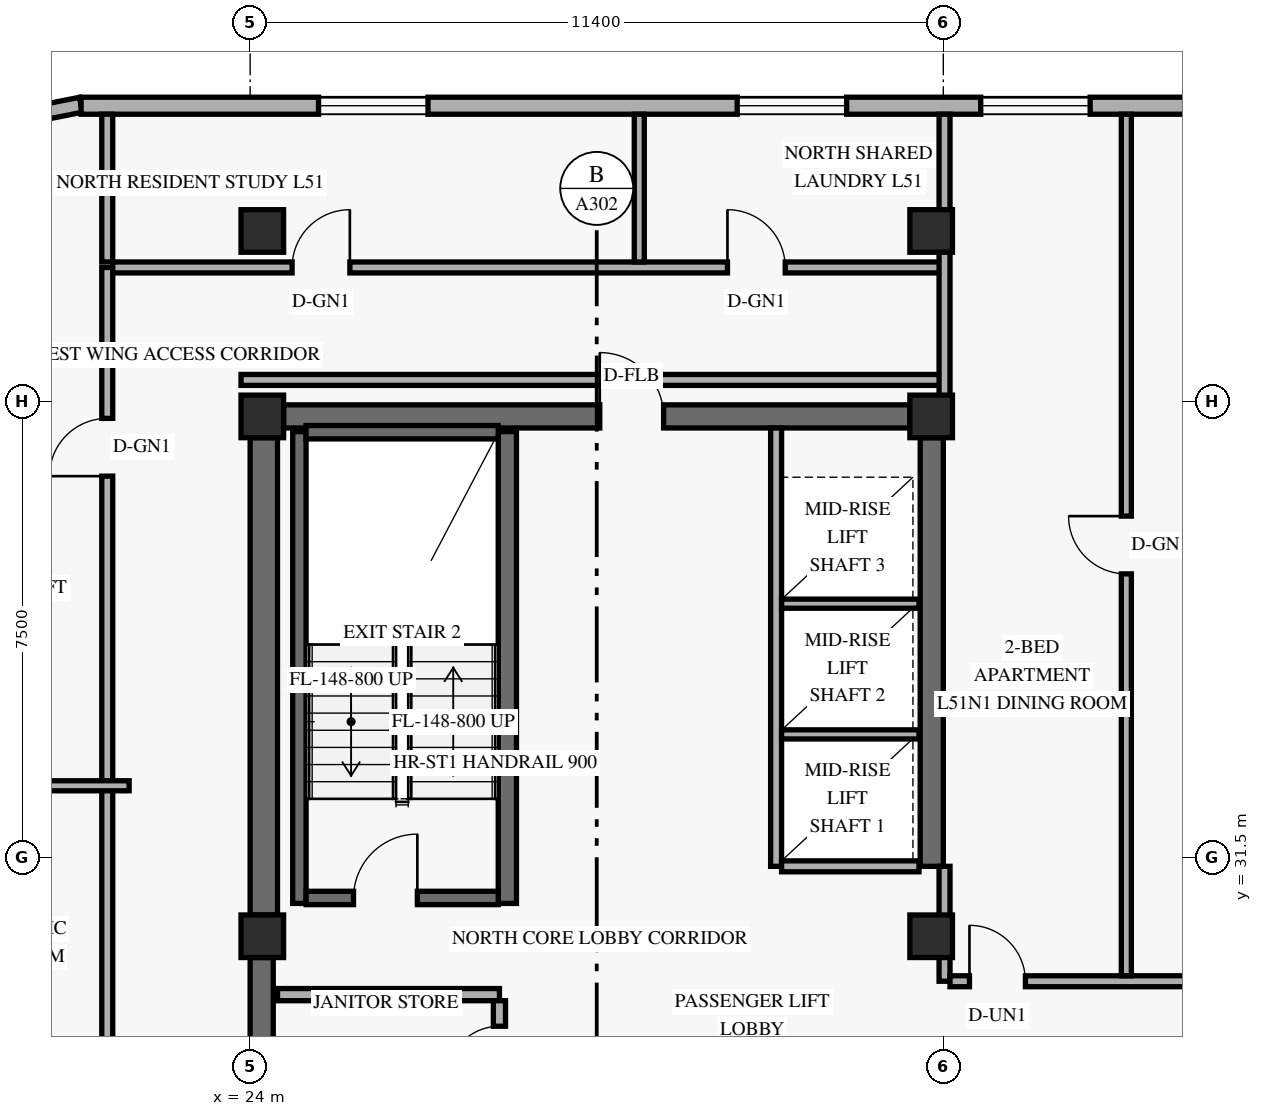
"""IFC4 building model, lengths in metres.
Left out: names, types, materials, properties, quantities, classifications, styles, units other than length and angle.
Written with IfcOpenShell. Run it as: python <this file> out.ifc"""

import sys

from ifc_helpers import new_model, si_unit, direction, frame, frame_2d, origin, origin_2d, place, context, subcontext, project, spatial, rectangle, extrude, element, fill, save


model = new_model("IFC4")
c1 = context("Model", 3, precision=1e-05, world=origin(), true_north=direction((0.0, 1.0)))
c2 = subcontext(c1, "Body", "Model", "MODEL_VIEW")
j1 = project(units=[si_unit("LENGTHUNIT", "METRE"), si_unit("PLANEANGLEUNIT", "RADIAN")], contexts=[c1])
p1 = place(None, origin())
s1 = spatial("IfcSite", under=j1, at=p1, CompositionType="ELEMENT")
p2 = place(p1, origin())
s2 = spatial("IfcBuilding", under=s1, at=p2, CompositionType="ELEMENT")
p3 = place(p2, frame((0.0, 0.0, 196.2)))
s3 = spatial("IfcBuildingStorey", under=s2, at=p3, CompositionType="ELEMENT", Elevation=196.2)
p4 = place(p3, frame((24.19, 17.9, 0.0), z_axis=(0.0, 0.0, 1.0), x_axis=(0.0, 1.0, 0.0)))
e1 = element("IfcWall", 1, at=p4, inside=s3, PredefinedType="SHEAR", context=c2, shape_type="SweptSolid", body=[
    extrude(rectangle(XDim=11.95, YDim=0.38, at=frame_2d((5.975, 0.0))), origin(), (0.0, 0.0, 1.0), 2.688),
])
p5 = place(p3, frame((24.225, 30.55, 0.0), z_axis=(0.0, 0.0, 1.0), x_axis=(0.0, 1.0, 0.0)))
e2 = element("IfcWall", 2, at=p5, inside=s3, PredefinedType="SHEAR", context=c2, shape_type="SweptSolid", body=[
    extrude(rectangle(XDim=7.85, YDim=0.45, at=frame_2d((3.925, 0.0))), origin(), (0.0, 0.0, 1.0), 2.688),
])
p6 = place(p3, frame((35.21, 31.35, 0.0), z_axis=(0.0, 0.0, 1.0), x_axis=(0.0, 1.0, 0.0)))
e3 = element("IfcWall", 3, at=p6, inside=s3, PredefinedType="SHEAR", context=c2, shape_type="SweptSolid", body=[
    extrude(rectangle(XDim=7.05, YDim=0.38, at=frame_2d((3.525, 0.0))), origin(), (0.0, 0.0, 1.0), 2.688),
])
p7 = place(p3, frame((24.55, 38.75, 0.0), z_axis=(0.0, 0.0, 1.0), x_axis=(1.0, 0.0, 0.0)))
e4 = element("IfcWall", 4, at=p7, inside=s3, PredefinedType="SHEAR", context=c2, shape_type="SweptSolid", body=[
    extrude(rectangle(XDim=10.3, YDim=0.38, at=frame_2d((5.15, 0.0))), origin(), (0.0, 0.0, 1.0), 3.3),
])
p8 = place(p7, frame((5.2, 0.0, 0.0)))
e5 = element("IfcOpeningElement", 5, at=p8, cuts=e4, PredefinedType="OPENING", context=c2, shape_type="SweptSolid", body=[
    extrude(rectangle(XDim=1.05, YDim=2.15, at=frame_2d((0.525, 1.075))), frame((0.0, 0.2, 0.0), z_axis=(0.0, -1.0, 0.0), x_axis=(1.0, 0.0, 0.0)), (0.0, 0.0, 1.0), 0.4),
])
p9 = place(p3, frame((24.81, 30.74, 0.0), z_axis=(0.0, 0.0, 1.0), x_axis=(0.0, 1.0, 0.0)))
e6 = element("IfcWall", 6, at=p9, inside=s3, PredefinedType="SHEAR", context=c2, shape_type="SweptSolid", body=[
    extrude(rectangle(XDim=7.76, YDim=0.22, at=frame_2d((3.88, 0.0))), origin(), (0.0, 0.0, 1.0), 3.3),
])
p10 = place(p3, frame((28.23, 30.74, 0.0), z_axis=(0.0, 0.0, 1.0), x_axis=(0.0, 1.0, 0.0)))
e7 = element("IfcWall", 7, at=p10, inside=s3, PredefinedType="SHEAR", context=c2, shape_type="SweptSolid", body=[
    extrude(rectangle(XDim=7.76, YDim=0.3, at=frame_2d((3.88, 0.0))), origin(), (0.0, 0.0, 1.0), 3.3),
])
p11 = place(p3, frame((24.92, 30.83, 0.0), z_axis=(0.0, 0.0, 1.0), x_axis=(1.0, 0.0, 0.0)))
e8 = element("IfcWall", 8, at=p11, inside=s3, PredefinedType="SHEAR", context=c2, shape_type="SweptSolid", body=[
    extrude(rectangle(XDim=3.16, YDim=0.22, at=frame_2d((1.58, 0.0))), origin(), (0.0, 0.0, 1.0), 3.3),
])
p12 = place(p11, frame((0.78, 0.0, 0.0)))
e9 = element("IfcOpeningElement", 9, at=p12, cuts=e8, PredefinedType="OPENING", context=c2, shape_type="SweptSolid", body=[
    extrude(rectangle(XDim=1.05, YDim=2.15, at=frame_2d((0.525, 1.075))), frame((0.0, 0.12, 0.0), z_axis=(0.0, -1.0, 0.0), x_axis=(1.0, 0.0, 0.0)), (0.0, 0.0, 1.0), 0.24),
])
p13 = place(p3, frame((24.92, 38.49, 0.0), z_axis=(0.0, 0.0, 1.0), x_axis=(1.0, 0.0, 0.0)))
e10 = element("IfcWall", 10, at=p13, inside=s3, PredefinedType="SHEAR", context=c2, shape_type="SweptSolid", body=[
    extrude(rectangle(XDim=3.16, YDim=0.22, at=frame_2d((1.58, 0.0))), origin(), (0.0, 0.0, 1.0), 3.3),
])
for number, where, z_axis, x_axis in (
    (11, (24.2, 30.2, 0.0), (0.0, 0.0, 1.0), (1.0, 0.0, 0.0)),
    (12, (24.2, 38.75, 0.0), (0.0, 0.0, 1.0), (1.0, 0.0, 0.0)),
    (13, (24.2, 41.8, 0.0), (0.0, 0.0, 1.0), (1.0, 0.0, 0.0)),
    (14, (35.2, 30.2, 0.0), (0.0, 0.0, 1.0), (1.0, 0.0, 0.0)),
    (15, (35.2, 38.75, 0.0), (0.0, 0.0, 1.0), (1.0, 0.0, 0.0)),
    (16, (35.2, 41.8, 0.0), (0.0, 0.0, 1.0), (1.0, 0.0, 0.0)),
):
    element("IfcColumn", number, at=place(p3, frame(where, z_axis=z_axis, x_axis=x_axis)), inside=s3, PredefinedType="COLUMN", context=c2, shape_type="SweptSolid", body=[
        extrude(rectangle(XDim=0.7, YDim=0.7, at=origin_2d()), origin(), (0.0, 0.0, 1.0), 3.6),
    ])
p14 = place(p3, frame((21.217, 43.876, 0.0), z_axis=(0.0, 0.0, 1.0), x_axis=(-0.980809899341, -0.19496651342, 0.0)))
e17 = element("IfcWall", 17, at=p14, inside=s3, PredefinedType="SOLIDWALL", context=c2, shape_type="SweptSolid", body=[
    extrude(rectangle(XDim=1.389, YDim=0.25, at=frame_2d((0.694, 0.0))), origin(), (0.0, 0.0, 1.0), 3.3),
])
p15 = place(p3, frame((54.98, 43.86, 0.0), z_axis=(0.0, 0.0, 1.0), x_axis=(-1.0, 0.0, 0.0)))
e18 = element("IfcWall", 18, at=p15, inside=s3, PredefinedType="SOLIDWALL", context=c2, shape_type="SweptSolid", body=[
    extrude(rectangle(XDim=33.76, YDim=0.28, at=frame_2d((16.88, 0.0))), origin(), (0.0, 0.0, 1.0), 3.3),
])
p16 = place(p15, frame((28.055, 0.0, 0.85)))
e19 = element("IfcOpeningElement", 19, at=p16, cuts=e18, PredefinedType="OPENING", context=c2, shape_type="SweptSolid", body=[
    extrude(rectangle(XDim=1.8, YDim=1.6, at=frame_2d((0.9, 0.8))), frame((0.0, 0.15, 0.0), z_axis=(0.0, -1.0, 0.0), x_axis=(1.0, 0.0, 0.0)), (0.0, 0.0, 1.0), 0.3),
])
p17 = place(p15, frame((21.17, 0.0, 0.85)))
e20 = element("IfcOpeningElement", 20, at=p17, cuts=e18, PredefinedType="OPENING", context=c2, shape_type="SweptSolid", body=[
    extrude(rectangle(XDim=1.8, YDim=1.6, at=frame_2d((0.9, 0.8))), frame((0.0, 0.15, 0.0), z_axis=(0.0, -1.0, 0.0), x_axis=(1.0, 0.0, 0.0)), (0.0, 0.0, 1.0), 0.3),
])
p18 = place(p15, frame((17.165, 0.0, 0.85)))
e21 = element("IfcOpeningElement", 21, at=p18, cuts=e18, PredefinedType="OPENING", context=c2, shape_type="SweptSolid", body=[
    extrude(rectangle(XDim=1.8, YDim=1.6, at=frame_2d((0.9, 0.8))), frame((0.0, 0.15, 0.0), z_axis=(0.0, -1.0, 0.0), x_axis=(1.0, 0.0, 0.0)), (0.0, 0.0, 1.0), 0.3),
])
p19 = place(p15, frame((12.77, 0.0, 0.85)))
e22 = element("IfcOpeningElement", 22, at=p19, cuts=e18, PredefinedType="OPENING", context=c2, shape_type="SweptSolid", body=[
    extrude(rectangle(XDim=1.8, YDim=1.6, at=frame_2d((0.9, 0.8))), frame((0.0, 0.15, 0.0), z_axis=(0.0, -1.0, 0.0), x_axis=(1.0, 0.0, 0.0)), (0.0, 0.0, 1.0), 0.3),
])
p20 = place(p15, frame((7.375, 0.0, 0.85)))
e23 = element("IfcOpeningElement", 23, at=p20, cuts=e18, PredefinedType="OPENING", context=c2, shape_type="SweptSolid", body=[
    extrude(rectangle(XDim=1.8, YDim=1.6, at=frame_2d((0.9, 0.8))), frame((0.0, 0.15, 0.0), z_axis=(0.0, -1.0, 0.0), x_axis=(1.0, 0.0, 0.0)), (0.0, 0.0, 1.0), 0.3),
])
p21 = place(p15, frame((4.28, 0.0, 0.85)))
e24 = element("IfcOpeningElement", 24, at=p21, cuts=e18, PredefinedType="OPENING", context=c2, shape_type="SweptSolid", body=[
    extrude(rectangle(XDim=1.2, YDim=1.5, at=frame_2d((0.6, 0.75))), frame((0.0, 0.15, 0.0), z_axis=(0.0, -1.0, 0.0), x_axis=(1.0, 0.0, 0.0)), (0.0, 0.0, 1.0), 0.3),
])
p22 = place(p15, frame((1.09, 0.0, 0.85)))
e25 = element("IfcOpeningElement", 25, at=p22, cuts=e18, PredefinedType="OPENING", context=c2, shape_type="SweptSolid", body=[
    extrude(rectangle(XDim=1.8, YDim=1.6, at=frame_2d((0.9, 0.8))), frame((0.0, 0.15, 0.0), z_axis=(0.0, -1.0, 0.0), x_axis=(1.0, 0.0, 0.0)), (0.0, 0.0, 1.0), 0.3),
])
p23 = place(p3, frame((24.45, 29.24, 0.0), z_axis=(0.0, 0.0, 1.0), x_axis=(1.0, 0.0, 0.0)))
e26 = element("IfcWall", 26, at=p23, inside=s3, PredefinedType="STANDARD", context=c2, shape_type="SweptSolid", body=[
    extrude(rectangle(XDim=3.65, YDim=0.2, at=frame_2d((1.825, 0.0))), origin(), (0.0, 0.0, 1.0), 3.3),
])
p24 = place(p3, frame((28.1, 24.39, 0.0), z_axis=(0.0, 0.0, 1.0), x_axis=(0.0, 1.0, 0.0)))
e27 = element("IfcWall", 27, at=p24, inside=s3, PredefinedType="STANDARD", context=c2, shape_type="SweptSolid", body=[
    extrude(rectangle(XDim=4.75, YDim=0.2, at=frame_2d((2.375, 0.0))), origin(), (0.0, 0.0, 1.0), 3.3),
])
p25 = place(p24, frame((0.21, 0.0, 0.0)))
e28 = element("IfcOpeningElement", 28, at=p25, cuts=e27, PredefinedType="OPENING", context=c2, shape_type="SweptSolid", body=[
    extrude(rectangle(XDim=0.86, YDim=2.1, at=frame_2d((0.43, 1.05))), frame((0.0, 0.11, 0.0), z_axis=(0.0, -1.0, 0.0), x_axis=(1.0, 0.0, 0.0)), (0.0, 0.0, 1.0), 0.22),
])
p26 = place(p24, frame((1.83, 0.0, 0.0)))
e29 = element("IfcOpeningElement", 29, at=p26, cuts=e27, PredefinedType="OPENING", context=c2, shape_type="SweptSolid", body=[
    extrude(rectangle(XDim=0.86, YDim=2.1, at=frame_2d((0.43, 1.05))), frame((0.0, 0.11, 0.0), z_axis=(0.0, -1.0, 0.0), x_axis=(1.0, 0.0, 0.0)), (0.0, 0.0, 1.0), 0.22),
])
p27 = place(p24, frame((3.47, 0.0, 0.0)))
e30 = element("IfcOpeningElement", 30, at=p27, cuts=e27, PredefinedType="OPENING", context=c2, shape_type="SweptSolid", body=[
    extrude(rectangle(XDim=0.86, YDim=2.1, at=frame_2d((0.43, 1.05))), frame((0.0, 0.11, 0.0), z_axis=(0.0, -1.0, 0.0), x_axis=(1.0, 0.0, 0.0)), (0.0, 0.0, 1.0), 0.22),
])
p28 = place(p3, frame((32.65, 31.35, 0.0), z_axis=(0.0, 0.0, 1.0), x_axis=(0.0, 1.0, 0.0)))
e31 = element("IfcWall", 31, at=p28, inside=s3, PredefinedType="STANDARD", context=c2, shape_type="SweptSolid", body=[
    extrude(rectangle(XDim=7.21, YDim=0.18, at=frame_2d((3.605, 0.0))), origin(), (0.0, 0.0, 1.0), 3.3),
])
p29 = place(p3, frame((32.74, 31.35, 0.0), z_axis=(0.0, 0.0, 1.0), x_axis=(1.0, 0.0, 0.0)))
e32 = element("IfcWall", 32, at=p29, inside=s3, PredefinedType="STANDARD", context=c2, shape_type="SweptSolid", body=[
    extrude(rectangle(XDim=2.26, YDim=0.18, at=frame_2d((1.13, 0.0))), origin(), (0.0, 0.0, 1.0), 3.3),
])
for number, where, z_axis, x_axis in (
    (33, (32.74, 33.52, 0.0), (0.0, 0.0, 1.0), (1.0, 0.0, 0.0)),
    (34, (32.74, 35.67, 0.0), (0.0, 0.0, 1.0), (1.0, 0.0, 0.0)),
):
    element("IfcWall", number, at=place(p3, frame(where, z_axis=z_axis, x_axis=x_axis)), inside=s3, PredefinedType="STANDARD", context=c2, shape_type="SweptSolid", body=[
        extrude(rectangle(XDim=2.26, YDim=0.15, at=frame_2d((1.13, 0.0))), origin(), (0.0, 0.0, 1.0), 3.3),
    ])
p30 = place(p3, frame((35.42, 29.46, 0.0), z_axis=(0.0, 0.0, 1.0), x_axis=(0.0, 1.0, 0.0)))
e35 = element("IfcWall", 35, at=p30, inside=s3, PredefinedType="STANDARD", context=c2, shape_type="SweptSolid", body=[
    extrude(rectangle(XDim=1.89, YDim=0.18, at=frame_2d((0.945, 0.0))), origin(), (0.0, 0.0, 1.0), 2.67),
])
p31 = place(p3, frame((35.51, 29.46, 0.0), z_axis=(0.0, 0.0, 1.0), x_axis=(1.0, 0.0, 0.0)))
e36 = element("IfcWall", 36, at=p31, inside=s3, PredefinedType="STANDARD", context=c2, shape_type="SweptSolid", body=[
    extrude(rectangle(XDim=13.69, YDim=0.18, at=frame_2d((6.845, 0.0))), origin(), (0.0, 0.0, 1.0), 2.67),
])
p32 = place(p31, frame((0.32, 0.0, 0.0)))
e37 = element("IfcOpeningElement", 37, at=p32, cuts=e36, PredefinedType="OPENING", context=c2, shape_type="SweptSolid", body=[
    extrude(rectangle(XDim=0.92, YDim=2.15, at=frame_2d((0.46, 1.075))), frame((0.0, 0.1, 0.0), z_axis=(0.0, -1.0, 0.0), x_axis=(1.0, 0.0, 0.0)), (0.0, 0.0, 1.0), 0.2),
])
p33 = place(p3, frame((21.65, 6.8, 0.0), z_axis=(0.0, 0.0, 1.0), x_axis=(0.0, 1.0, 0.0)))
e38 = element("IfcWall", 38, at=p33, inside=s3, PredefinedType="STANDARD", context=c2, shape_type="SweptSolid", body=[
    extrude(rectangle(XDim=34.4, YDim=0.18, at=frame_2d((17.2, 0.0))), origin(), (0.0, 0.0, 1.0), 2.67),
])
p34 = place(p33, frame((1.732, 0.0, 0.0)))
e39 = element("IfcOpeningElement", 39, at=p34, cuts=e38, PredefinedType="OPENING", context=c2, shape_type="SweptSolid", body=[
    extrude(rectangle(XDim=0.95, YDim=2.15, at=frame_2d((0.475, 1.075))), frame((0.0, 0.1, 0.0), z_axis=(0.0, -1.0, 0.0), x_axis=(1.0, 0.0, 0.0)), (0.0, 0.0, 1.0), 0.2),
])
p35 = place(p33, frame((10.768, 0.0, 0.0)))
e40 = element("IfcOpeningElement", 40, at=p35, cuts=e38, PredefinedType="OPENING", context=c2, shape_type="SweptSolid", body=[
    extrude(rectangle(XDim=0.95, YDim=2.15, at=frame_2d((0.475, 1.075))), frame((0.0, 0.1, 0.0), z_axis=(0.0, -1.0, 0.0), x_axis=(1.0, 0.0, 0.0)), (0.0, 0.0, 1.0), 0.2),
])
p36 = place(p33, frame((20.333, 0.0, 0.0)))
e41 = element("IfcOpeningElement", 41, at=p36, cuts=e38, PredefinedType="OPENING", context=c2, shape_type="SweptSolid", body=[
    extrude(rectangle(XDim=0.95, YDim=2.15, at=frame_2d((0.475, 1.075))), frame((0.0, 0.1, 0.0), z_axis=(0.0, -1.0, 0.0), x_axis=(1.0, 0.0, 0.0)), (0.0, 0.0, 1.0), 0.2),
])
p37 = place(p33, frame((30.968, 0.0, 0.0)))
e42 = element("IfcOpeningElement", 42, at=p37, cuts=e38, PredefinedType="OPENING", context=c2, shape_type="SweptSolid", body=[
    extrude(rectangle(XDim=0.95, YDim=2.15, at=frame_2d((0.475, 1.075))), frame((0.0, 0.1, 0.0), z_axis=(0.0, -1.0, 0.0), x_axis=(1.0, 0.0, 0.0)), (0.0, 0.0, 1.0), 0.2),
])
p38 = place(p3, frame((21.74, 41.2, 0.0), z_axis=(0.0, 0.0, 1.0), x_axis=(1.0, 0.0, 0.0)))
e43 = element("IfcWall", 43, at=p38, inside=s3, PredefinedType="STANDARD", context=c2, shape_type="SweptSolid", body=[
    extrude(rectangle(XDim=13.68, YDim=0.18, at=frame_2d((6.84, 0.0))), origin(), (0.0, 0.0, 1.0), 2.67),
])
p39 = place(p38, frame((2.95, 0.0, 0.0)))
e44 = element("IfcOpeningElement", 44, at=p39, cuts=e43, PredefinedType="OPENING", context=c2, shape_type="SweptSolid", body=[
    extrude(rectangle(XDim=0.95, YDim=2.15, at=frame_2d((0.475, 1.075))), frame((0.0, 0.1, 0.0), z_axis=(0.0, -1.0, 0.0), x_axis=(1.0, 0.0, 0.0)), (0.0, 0.0, 1.0), 0.2),
])
p40 = place(p38, frame((10.11, 0.0, 0.0)))
e45 = element("IfcOpeningElement", 45, at=p40, cuts=e43, PredefinedType="OPENING", context=c2, shape_type="SweptSolid", body=[
    extrude(rectangle(XDim=0.95, YDim=2.15, at=frame_2d((0.475, 1.075))), frame((0.0, 0.1, 0.0), z_axis=(0.0, -1.0, 0.0), x_axis=(1.0, 0.0, 0.0)), (0.0, 0.0, 1.0), 0.2),
])
p41 = place(p3, frame((23.85, 39.35, 0.0), z_axis=(0.0, 0.0, 1.0), x_axis=(1.0, 0.0, 0.0)))
e46 = element("IfcWall", 46, at=p41, inside=s3, PredefinedType="STANDARD", context=c2, shape_type="SweptSolid", body=[
    extrude(rectangle(XDim=11.57, YDim=0.18, at=frame_2d((5.785, 0.0))), origin(), (0.0, 0.0, 1.0), 2.67),
])
p42 = place(p3, frame((21.65, 41.29, 0.0), z_axis=(0.0, 0.0, 1.0), x_axis=(0.0, 1.0, 0.0)))
e47 = element("IfcWall", 47, at=p42, inside=s3, PredefinedType="PARTITIONING", context=c2, shape_type="SweptSolid", body=[
    extrude(rectangle(XDim=2.43, YDim=0.18, at=frame_2d((1.215, 0.0))), origin(), (0.0, 0.0, 1.0), 2.819),
])
p43 = place(p3, frame((35.42, 38.75, 0.0), z_axis=(0.0, 0.0, 1.0), x_axis=(0.0, 1.0, 0.0)))
e48 = element("IfcWall", 48, at=p43, inside=s3, PredefinedType="PARTITIONING", context=c2, shape_type="SweptSolid", body=[
    extrude(rectangle(XDim=4.97, YDim=0.18, at=frame_2d((2.485, 0.0))), origin(), (0.0, 0.0, 1.0), 2.67),
])
p44 = place(p3, frame((38.41, 29.55, 0.0), z_axis=(0.0, 0.0, 1.0), x_axis=(0.0, 1.0, 0.0)))
e49 = element("IfcWall", 49, at=p44, inside=s3, PredefinedType="PARTITIONING", context=c2, shape_type="SweptSolid", body=[
    extrude(rectangle(XDim=14.17, YDim=0.165, at=frame_2d((7.085, 0.0))), origin(), (0.0, 0.0, 1.0), 2.67),
])
p45 = place(p44, frame((6.61, 0.0, 0.0)))
e50 = element("IfcOpeningElement", 50, at=p45, cuts=e49, PredefinedType="OPENING", context=c2, shape_type="SweptSolid", body=[
    extrude(rectangle(XDim=0.95, YDim=2.15, at=frame_2d((0.475, 1.075))), frame((0.0, 0.093, 0.0), z_axis=(0.0, -1.0, 0.0), x_axis=(1.0, 0.0, 0.0)), (0.0, 0.0, 1.0), 0.185),
])
p46 = place(p3, frame((17.88, 32.675, 0.0), z_axis=(0.0, 0.0, 1.0), x_axis=(1.0, 0.0, 0.0)))
e51 = element("IfcWall", 51, at=p46, inside=s3, PredefinedType="PARTITIONING", context=c2, shape_type="SweptSolid", body=[
    extrude(rectangle(XDim=4.13, YDim=0.165, at=frame_2d((2.065, 0.0))), origin(), (0.0, 0.0, 1.0), 2.819),
])
p47 = place(p3, frame((30.4, 41.29, 0.0), z_axis=(0.0, 0.0, 1.0), x_axis=(0.0, 1.0, 0.0)))
e52 = element("IfcWall", 52, at=p47, inside=s3, PredefinedType="PARTITIONING", context=c2, shape_type="SweptSolid", body=[
    extrude(rectangle(XDim=2.43, YDim=0.165, at=frame_2d((1.215, 0.0))), origin(), (0.0, 0.0, 1.0), 2.819),
])
p48 = place(p16, origin())
e53 = element("IfcWindow", 53, at=p48, inside=s3, PartitioningType="SINGLE_PANEL", PredefinedType="WINDOW", context=c2, shape_type="SweptSolid", body=[
    extrude(rectangle(XDim=1.8, YDim=1.6, at=frame_2d((0.9, 0.8))), frame((0.0, 0.03, 0.0), z_axis=(0.0, -1.0, 0.0), x_axis=(1.0, 0.0, 0.0)), (0.0, 0.0, 1.0), 0.06),
])
fill(e19, e53)
p49 = place(p17, origin())
e54 = element("IfcWindow", 54, at=p49, inside=s3, PartitioningType="SINGLE_PANEL", PredefinedType="WINDOW", context=c2, shape_type="SweptSolid", body=[
    extrude(rectangle(XDim=1.8, YDim=1.6, at=frame_2d((0.9, 0.8))), frame((0.0, 0.03, 0.0), z_axis=(0.0, -1.0, 0.0), x_axis=(1.0, 0.0, 0.0)), (0.0, 0.0, 1.0), 0.06),
])
fill(e20, e54)
p50 = place(p18, origin())
e55 = element("IfcWindow", 55, at=p50, inside=s3, PartitioningType="SINGLE_PANEL", PredefinedType="WINDOW", context=c2, shape_type="SweptSolid", body=[
    extrude(rectangle(XDim=1.8, YDim=1.6, at=frame_2d((0.9, 0.8))), frame((0.0, 0.03, 0.0), z_axis=(0.0, -1.0, 0.0), x_axis=(1.0, 0.0, 0.0)), (0.0, 0.0, 1.0), 0.06),
])
fill(e21, e55)
p51 = place(p12, origin())
e56 = element("IfcDoor", 56, at=p51, inside=s3, OperationType="SINGLE_SWING_RIGHT", PredefinedType="DOOR", context=c2, shape_type="SweptSolid", body=[
    extrude(rectangle(XDim=1.05, YDim=2.15, at=frame_2d((0.525, 1.075))), frame((0.0, 0.025, 0.0), z_axis=(0.0, -1.0, 0.0), x_axis=(1.0, 0.0, 0.0)), (0.0, 0.0, 1.0), 0.05),
])
fill(e9, e56)
p52 = place(p27, origin())
e57 = element("IfcDoor", 57, at=p52, inside=s3, OperationType="SINGLE_SWING_LEFT", PredefinedType="DOOR", context=c2, shape_type="SweptSolid", body=[
    extrude(rectangle(XDim=0.86, YDim=2.1, at=frame_2d((0.43, 1.05))), frame((0.0, 0.025, 0.0), z_axis=(0.0, -1.0, 0.0), x_axis=(1.0, 0.0, 0.0)), (0.0, 0.0, 1.0), 0.05),
])
fill(e30, e57)
p53 = place(p8, frame((1.05, 0.0, 0.0), z_axis=(0.0, 0.0, 1.0), x_axis=(-1.0, 0.0, 0.0)))
e58 = element("IfcDoor", 58, at=p53, inside=s3, OperationType="SINGLE_SWING_RIGHT", PredefinedType="DOOR", context=c2, shape_type="SweptSolid", body=[
    extrude(rectangle(XDim=1.05, YDim=2.15, at=frame_2d((0.525, 1.075))), frame((0.0, 0.025, 0.0), z_axis=(0.0, -1.0, 0.0), x_axis=(1.0, 0.0, 0.0)), (0.0, 0.0, 1.0), 0.05),
])
fill(e5, e58)
p54 = place(p45, origin())
e59 = element("IfcDoor", 59, at=p54, inside=s3, OperationType="SINGLE_SWING_RIGHT", PredefinedType="DOOR", context=c2, shape_type="SweptSolid", body=[
    extrude(rectangle(XDim=0.95, YDim=2.15, at=frame_2d((0.475, 1.075))), frame((0.0, 0.025, 0.0), z_axis=(0.0, -1.0, 0.0), x_axis=(1.0, 0.0, 0.0)), (0.0, 0.0, 1.0), 0.05),
])
fill(e50, e59)
p55 = place(p32, origin())
e60 = element("IfcDoor", 60, at=p55, inside=s3, OperationType="SINGLE_SWING_LEFT", PredefinedType="DOOR", context=c2, shape_type="SweptSolid", body=[
    extrude(rectangle(XDim=0.92, YDim=2.15, at=frame_2d((0.46, 1.075))), frame((0.0, 0.025, 0.0), z_axis=(0.0, -1.0, 0.0), x_axis=(1.0, 0.0, 0.0)), (0.0, 0.0, 1.0), 0.05),
])
fill(e37, e60)
p56 = place(p37, origin())
e61 = element("IfcDoor", 61, at=p56, inside=s3, OperationType="SINGLE_SWING_LEFT", PredefinedType="DOOR", context=c2, shape_type="SweptSolid", body=[
    extrude(rectangle(XDim=0.95, YDim=2.15, at=frame_2d((0.475, 1.075))), frame((0.0, 0.025, 0.0), z_axis=(0.0, -1.0, 0.0), x_axis=(1.0, 0.0, 0.0)), (0.0, 0.0, 1.0), 0.05),
])
fill(e42, e61)
p57 = place(p39, origin())
e62 = element("IfcDoor", 62, at=p57, inside=s3, OperationType="SINGLE_SWING_RIGHT", PredefinedType="DOOR", context=c2, shape_type="SweptSolid", body=[
    extrude(rectangle(XDim=0.95, YDim=2.15, at=frame_2d((0.475, 1.075))), frame((0.0, 0.025, 0.0), z_axis=(0.0, -1.0, 0.0), x_axis=(1.0, 0.0, 0.0)), (0.0, 0.0, 1.0), 0.05),
])
fill(e44, e62)
p58 = place(p40, origin())
e63 = element("IfcDoor", 63, at=p58, inside=s3, OperationType="SINGLE_SWING_LEFT", PredefinedType="DOOR", context=c2, shape_type="SweptSolid", body=[
    extrude(rectangle(XDim=0.95, YDim=2.15, at=frame_2d((0.475, 1.075))), frame((0.0, 0.025, 0.0), z_axis=(0.0, -1.0, 0.0), x_axis=(1.0, 0.0, 0.0)), (0.0, 0.0, 1.0), 0.05),
])
fill(e45, e63)
save(model, sys.argv[1])
